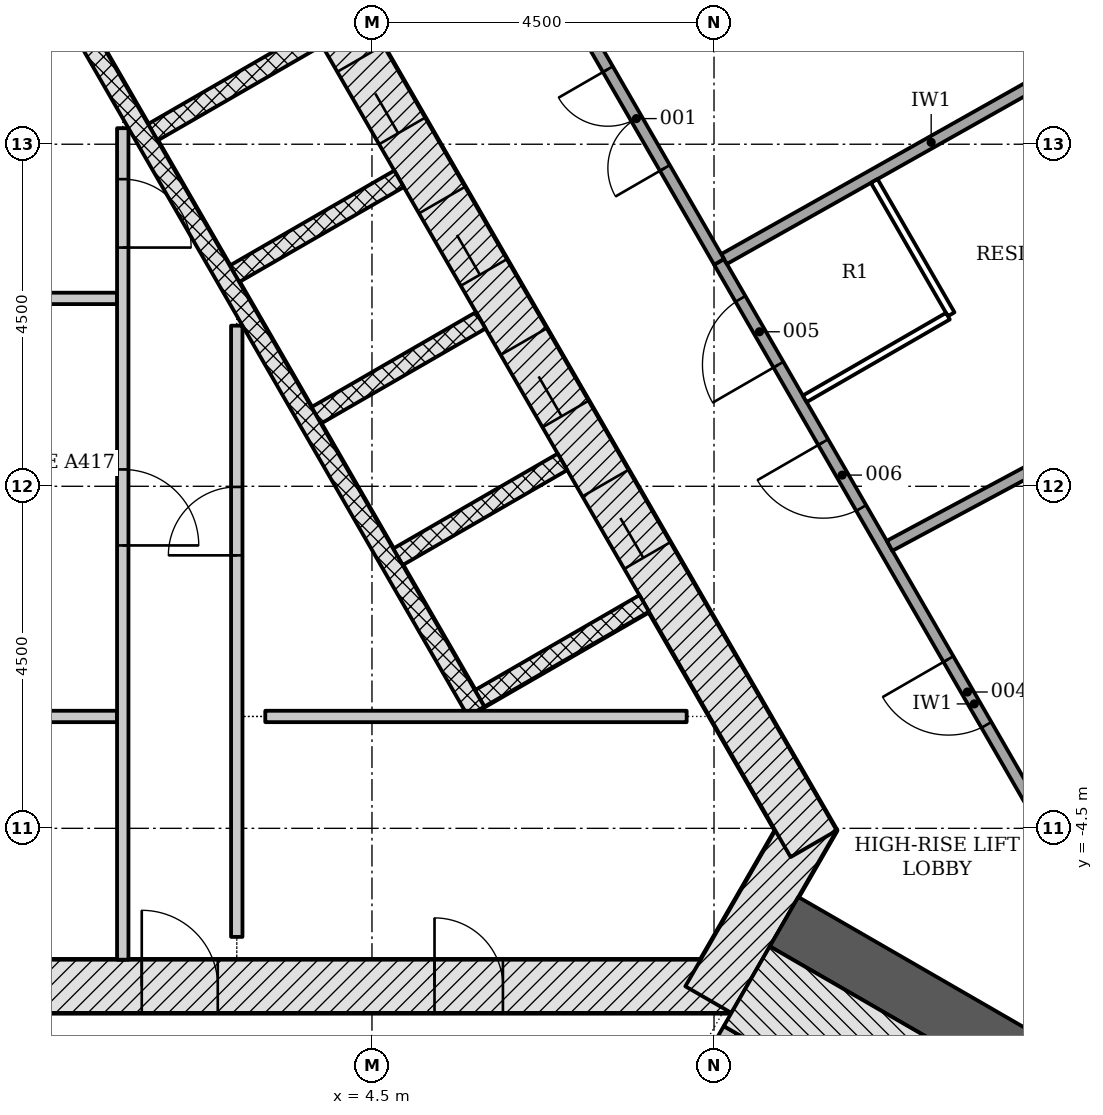
"""IFC4 building model, lengths in metres.
Left out: names, types, materials, properties, quantities, classifications, styles, units other than length and angle.
Written with IfcOpenShell. Run it as: python <this file> out.ifc"""

import sys

from ifc_helpers import new_model, si_unit, direction, frame, frame_2d, origin, place, context, subcontext, project, spatial, rectangle, extrude, element, fill, save


model = new_model("IFC4")
c1 = context("Model", 3, precision=1e-05, world=origin(), true_north=direction((0.0, 1.0)))
c2 = subcontext(c1, "Body", "Model", "MODEL_VIEW")
j1 = project(units=[si_unit("LENGTHUNIT", "METRE"), si_unit("PLANEANGLEUNIT", "RADIAN")], contexts=[c1])
p1 = place(None, origin())
s1 = spatial("IfcSite", under=j1, at=p1, CompositionType="ELEMENT")
p2 = place(p1, origin())
s2 = spatial("IfcBuilding", under=s1, at=p2, CompositionType="ELEMENT")
p3 = place(p2, frame((0.0, 0.0, 158.1)))
s3 = spatial("IfcBuildingStorey", under=s2, at=p3, CompositionType="ELEMENT", Elevation=158.1)
p4 = place(p3, frame((-9.229, -6.578, -0.2), z_axis=(0.0, 0.0, 1.0), x_axis=(1.0, 0.0, 0.0)))
e1 = element("IfcWall", 1, at=p4, inside=s3, PredefinedType="SHEAR", context=c2, shape_type="SweptSolid", body=[
    extrude(rectangle(XDim=18.458, YDim=0.7, at=frame_2d((9.229, 0.0))), origin(), (0.0, 0.0, 1.0), 3.6),
])
p5 = place(p4, frame((10.7, 0.0, 0.2)))
e2 = element("IfcOpeningElement", 2, at=p5, cuts=e1, PredefinedType="OPENING", context=c2, shape_type="SweptSolid", body=[
    extrude(rectangle(XDim=1.0, YDim=2.1, at=frame_2d((0.5, 1.05))), frame((0.0, 0.36, 0.0), z_axis=(0.0, -1.0, 0.0), x_axis=(1.0, 0.0, 0.0)), (0.0, 0.0, 1.0), 0.72),
])
p6 = place(p4, frame((4.977, 0.0, 0.2)))
e3 = element("IfcOpeningElement", 3, at=p6, cuts=e1, PredefinedType="OPENING", context=c2, shape_type="SweptSolid", body=[
    extrude(rectangle(XDim=0.9, YDim=2.1, at=frame_2d((0.45, 1.05))), frame((0.0, 0.36, 0.0), z_axis=(0.0, -1.0, 0.0), x_axis=(1.0, 0.0, 0.0)), (0.0, 0.0, 1.0), 0.72),
])
p7 = place(p4, frame((14.552, 0.0, 0.2)))
e4 = element("IfcOpeningElement", 4, at=p7, cuts=e1, PredefinedType="OPENING", context=c2, shape_type="SweptSolid", body=[
    extrude(rectangle(XDim=0.9, YDim=2.1, at=frame_2d((0.45, 1.05))), frame((0.0, 0.36, 0.0), z_axis=(0.0, -1.0, 0.0), x_axis=(1.0, 0.0, 0.0)), (0.0, 0.0, 1.0), 0.72),
])
p8 = place(p3, frame((8.926, -6.753, -0.2), z_axis=(0.0, 0.0, 1.0), x_axis=(0.500042739161, 0.866000726912, 0.0)))
e5 = element("IfcWall", 5, at=p8, inside=s3, PredefinedType="SHEAR", context=c2, shape_type="SweptSolid", body=[
    extrude(rectangle(XDim=2.771, YDim=0.7, at=frame_2d((1.386, 0.0))), origin(), (0.0, 0.0, 1.0), 3.6),
])
p9 = place(p3, frame((10.311, -4.703, -0.2), z_axis=(0.0, 0.0, 1.0), x_axis=(-0.500001446645, 0.866024568562, 0.0)))
e6 = element("IfcWall", 6, at=p9, inside=s3, PredefinedType="SHEAR", context=c2, shape_type="SweptSolid", body=[
    extrude(rectangle(XDim=18.458, YDim=0.7, at=frame_2d((9.229, 0.0))), origin(), (0.0, 0.0, 1.0), 3.6),
])
p10 = place(p9, frame((4.379, 0.0, 0.2)))
e7 = element("IfcOpeningElement", 7, at=p10, cuts=e6, PredefinedType="OPENING", context=c2, shape_type="SweptSolid", body=[
    extrude(rectangle(XDim=1.1, YDim=2.1, at=frame_2d((0.55, 1.05))), frame((0.0, 0.36, 0.0), z_axis=(0.0, -1.0, 0.0), x_axis=(1.0, 0.0, 0.0)), (0.0, 0.0, 1.0), 0.72),
])
p11 = place(p9, frame((6.529, 0.0, 0.2)))
e8 = element("IfcOpeningElement", 8, at=p11, cuts=e6, PredefinedType="OPENING", context=c2, shape_type="SweptSolid", body=[
    extrude(rectangle(XDim=1.1, YDim=2.1, at=frame_2d((0.55, 1.05))), frame((0.0, 0.36, 0.0), z_axis=(0.0, -1.0, 0.0), x_axis=(1.0, 0.0, 0.0)), (0.0, 0.0, 1.0), 0.72),
])
p12 = place(p9, frame((8.679, 0.0, 0.2)))
e9 = element("IfcOpeningElement", 9, at=p12, cuts=e6, PredefinedType="OPENING", context=c2, shape_type="SweptSolid", body=[
    extrude(rectangle(XDim=1.1, YDim=2.1, at=frame_2d((0.55, 1.05))), frame((0.0, 0.36, 0.0), z_axis=(0.0, -1.0, 0.0), x_axis=(1.0, 0.0, 0.0)), (0.0, 0.0, 1.0), 0.72),
])
p13 = place(p9, frame((10.829, 0.0, 0.2)))
e10 = element("IfcOpeningElement", 10, at=p13, cuts=e6, PredefinedType="OPENING", context=c2, shape_type="SweptSolid", body=[
    extrude(rectangle(XDim=1.1, YDim=2.1, at=frame_2d((0.55, 1.05))), frame((0.0, 0.36, 0.0), z_axis=(0.0, -1.0, 0.0), x_axis=(1.0, 0.0, 0.0)), (0.0, 0.0, 1.0), 0.72),
])
p14 = place(p9, frame((12.979, 0.0, 0.2)))
e11 = element("IfcOpeningElement", 11, at=p14, cuts=e6, PredefinedType="OPENING", context=c2, shape_type="SweptSolid", body=[
    extrude(rectangle(XDim=1.1, YDim=2.1, at=frame_2d((0.55, 1.05))), frame((0.0, 0.36, 0.0), z_axis=(0.0, -1.0, 0.0), x_axis=(1.0, 0.0, 0.0)), (0.0, 0.0, 1.0), 0.72),
])
p15 = place(p3, frame((9.922, -5.728, -0.2), z_axis=(0.0, 0.0, 1.0), x_axis=(0.866025410072, -0.499999989109, 0.0)))
e12 = element("IfcWall", 12, at=p15, inside=s3, PredefinedType="SHEAR", context=c2, shape_type="SweptSolid", body=[
    extrude(rectangle(XDim=10.331, YDim=0.75, at=frame_2d((5.165, 0.0))), origin(), (0.0, 0.0, 1.0), 3.6),
])
for number, where, z_axis, x_axis in (
    (13, (8.081, -1.541, -0.2), (0.0, 0.0, 1.0), (-0.866, -0.5, 0.0)),
    (14, (7.006, 0.321, -0.2), (0.0, 0.0, 1.0), (-0.866, -0.5, 0.0)),
):
    element("IfcWall", number, at=place(p3, frame(where, z_axis=z_axis, x_axis=x_axis)), inside=s3, PredefinedType="PARTITIONING", context=c2, shape_type="SweptSolid", body=[
        extrude(rectangle(XDim=2.5, YDim=0.25, at=frame_2d((1.25, 0.0))), origin(), (0.0, 0.0, 1.0), 3.6),
    ])
p16 = place(p3, frame((5.931, 2.183, -0.2), z_axis=(0.0, 0.0, 1.0), x_axis=(-0.866047370643, -0.499961950354, 0.0)))
e15 = element("IfcWall", 15, at=p16, inside=s3, PredefinedType="PARTITIONING", context=c2, shape_type="SweptSolid", body=[
    extrude(rectangle(XDim=2.5, YDim=0.25, at=frame_2d((1.25, 0.0))), origin(), (0.0, 0.0, 1.0), 3.6),
])
for number, where, z_axis, x_axis in (
    (16, (4.856, 4.045, -0.2), (0.0, 0.0, 1.0), (-0.866, -0.5, 0.0)),
    (17, (3.781, 5.907, -0.2), (0.0, 0.0, 1.0), (-0.866, -0.5, 0.0)),
):
    element("IfcWall", number, at=place(p3, frame(where, z_axis=z_axis, x_axis=x_axis)), inside=s3, PredefinedType="PARTITIONING", context=c2, shape_type="SweptSolid", body=[
        extrude(rectangle(XDim=2.5, YDim=0.25, at=frame_2d((1.25, 0.0))), origin(), (0.0, 0.0, 1.0), 3.6),
    ])
p17 = place(p3, frame((5.87, -2.961, 0.0), z_axis=(0.0, 0.0, 1.0), x_axis=(-0.50000615651, 0.866021849293, 0.0)))
e18 = element("IfcWall", 18, at=p17, inside=s3, PredefinedType="PARTITIONING", context=c2, shape_type="SweptSolid", body=[
    extrude(rectangle(XDim=11.0, YDim=0.25, at=frame_2d((5.5, 0.0))), origin(), (0.0, 0.0, 1.0), 3.4),
])
p18 = place(p3, frame((-5.258, -3.028, 0.0), z_axis=(0.0, 0.0, 1.0), x_axis=(1.0, 0.0, 0.0)))
e19 = element("IfcWall", 19, at=p18, inside=s3, PredefinedType="PARTITIONING", context=c2, shape_type="SweptSolid", body=[
    extrude(rectangle(XDim=6.404, YDim=0.15, at=frame_2d((3.202, 0.0))), origin(), (0.0, 0.0, 1.0), 3.4),
])
p19 = place(p3, frame((-2.551, 2.472, 0.0), z_axis=(0.0, 0.0, 1.0), x_axis=(1.0, 0.0, 0.0)))
e20 = element("IfcWall", 20, at=p19, inside=s3, PredefinedType="PARTITIONING", context=c2, shape_type="SweptSolid", body=[
    extrude(rectangle(XDim=3.698, YDim=0.15, at=frame_2d((1.849, 0.0))), origin(), (0.0, 0.0, 1.0), 3.4),
])
p20 = place(p3, frame((1.221, 4.711, 0.0), z_axis=(0.0, 0.0, 1.0), x_axis=(0.0, -1.0, 0.0)))
e21 = element("IfcWall", 21, at=p20, inside=s3, PredefinedType="PARTITIONING", context=c2, shape_type="SweptSolid", body=[
    extrude(rectangle(XDim=10.939, YDim=0.15, at=frame_2d((5.47, 0.0))), origin(), (0.0, 0.0, 1.0), 3.4),
])
p21 = place(p20, frame((4.489, 0.0, 0.0)))
e22 = element("IfcOpeningElement", 22, at=p21, cuts=e21, PredefinedType="OPENING", context=c2, shape_type="SweptSolid", body=[
    extrude(rectangle(XDim=1.0, YDim=2.1, at=frame_2d((0.5, 1.05))), frame((0.0, 0.085, 0.0), z_axis=(0.0, -1.0, 0.0), x_axis=(1.0, 0.0, 0.0)), (0.0, 0.0, 1.0), 0.17),
])
p22 = place(p20, frame((0.671, 0.0, 0.0)))
e23 = element("IfcOpeningElement", 23, at=p22, cuts=e21, PredefinedType="OPENING", context=c2, shape_type="SweptSolid", body=[
    extrude(rectangle(XDim=0.9, YDim=2.1, at=frame_2d((0.45, 1.05))), frame((0.0, 0.085, 0.0), z_axis=(0.0, -1.0, 0.0), x_axis=(1.0, 0.0, 0.0)), (0.0, 0.0, 1.0), 0.17),
])
p23 = place(p3, frame((2.721, -5.928, 0.0), z_axis=(0.0, 0.0, 1.0), x_axis=(0.0, 1.0, 0.0)))
e24 = element("IfcWall", 24, at=p23, inside=s3, PredefinedType="PARTITIONING", context=c2, shape_type="SweptSolid", body=[
    extrude(rectangle(XDim=8.041, YDim=0.15, at=frame_2d((4.021, 0.0))), origin(), (0.0, 0.0, 1.0), 3.4),
])
p24 = place(p23, frame((5.02, 0.0, 0.0)))
e25 = element("IfcOpeningElement", 25, at=p24, cuts=e24, PredefinedType="OPENING", context=c2, shape_type="SweptSolid", body=[
    extrude(rectangle(XDim=0.9, YDim=2.1, at=frame_2d((0.45, 1.05))), frame((0.0, 0.085, 0.0), z_axis=(0.0, -1.0, 0.0), x_axis=(1.0, 0.0, 0.0)), (0.0, 0.0, 1.0), 0.17),
])
p25 = place(p3, frame((3.096, -3.028, 0.0), z_axis=(0.0, 0.0, 1.0), x_axis=(1.0, 0.0, 0.0)))
e26 = element("IfcWall", 26, at=p25, inside=s3, PredefinedType="PARTITIONING", context=c2, shape_type="SweptSolid", body=[
    extrude(rectangle(XDim=5.544, YDim=0.15, at=frame_2d((2.772, 0.0))), origin(), (0.0, 0.0, 1.0), 3.4),
])
p26 = place(p3, frame((7.44, -10.226, -0.2), z_axis=(0.0, 0.0, 1.0), x_axis=(0.500022077904, 0.866012656725, 0.0)))
e27 = element("IfcWall", 27, at=p26, inside=s3, PredefinedType="SHEAR", context=c2, shape_type="SweptSolid", body=[
    extrude(rectangle(XDim=3.55, YDim=0.2, at=frame_2d((1.775, 0.0))), origin(), (0.0, 0.0, 1.0), 3.6),
])
p27 = place(p26, frame((1.175, 0.0, 0.2)))
e28 = element("IfcOpeningElement", 28, at=p27, cuts=e27, PredefinedType="OPENING", context=c2, shape_type="SweptSolid", body=[
    extrude(rectangle(XDim=1.2, YDim=2.1, at=frame_2d((0.6, 1.05))), frame((0.0, 0.11, 0.0), z_axis=(0.0, -1.0, 0.0), x_axis=(1.0, 0.0, 0.0)), (0.0, 0.0, 1.0), 0.22),
])
p28 = place(p3, frame((9.431, -6.577, -0.2), z_axis=(0.0, 0.0, 1.0), x_axis=(0.866018442252, -0.500012057535, 0.0)))
e29 = element("IfcWall", 29, at=p28, inside=s3, PredefinedType="SHEAR", context=c2, shape_type="SweptSolid", body=[
    extrude(rectangle(XDim=7.2, YDim=1.211, at=frame_2d((3.6, 0.0))), origin(), (0.0, 0.0, 1.0), 3.6),
])
p29 = place(p3, frame((15.782, -8.679, 0.0), z_axis=(0.0, 0.0, 1.0), x_axis=(-0.499998343211, 0.86602636033, 0.0)))
e30 = element("IfcWall", 30, at=p29, inside=s3, PredefinedType="PARTITIONING", context=c2, shape_type="SweptSolid", body=[
    extrude(rectangle(XDim=13.431, YDim=0.15, at=frame_2d((6.715, 0.0))), origin(), (0.0, 0.0, 1.0), 2.847),
])
p30 = place(p29, frame((6.396, 0.0, 0.0)))
e31 = element("IfcOpeningElement", 31, at=p30, cuts=e30, PredefinedType="OPENING", context=c2, shape_type="SweptSolid", body=[
    extrude(rectangle(XDim=1.0, YDim=2.1, at=frame_2d((0.5, 1.05))), frame((0.0, 0.085, 0.0), z_axis=(0.0, -1.0, 0.0), x_axis=(1.0, 0.0, 0.0)), (0.0, 0.0, 1.0), 0.17),
])
p31 = place(p29, frame((11.869, 0.0, 0.0)))
e32 = element("IfcOpeningElement", 32, at=p31, cuts=e30, PredefinedType="OPENING", context=c2, shape_type="SweptSolid", body=[
    extrude(rectangle(XDim=1.0, YDim=2.1, at=frame_2d((0.5, 1.05))), frame((0.0, 0.085, 0.0), z_axis=(0.0, -1.0, 0.0), x_axis=(1.0, 0.0, 0.0)), (0.0, 0.0, 1.0), 0.17),
])
p32 = place(p29, frame((9.691, 0.0, 0.0)))
e33 = element("IfcOpeningElement", 33, at=p32, cuts=e30, PredefinedType="OPENING", context=c2, shape_type="SweptSolid", body=[
    extrude(rectangle(XDim=1.0, YDim=2.1, at=frame_2d((0.5, 1.05))), frame((0.0, 0.085, 0.0), z_axis=(0.0, -1.0, 0.0), x_axis=(1.0, 0.0, 0.0)), (0.0, 0.0, 1.0), 0.17),
])
p33 = place(p3, frame((14.582, 6.06, 0.0), z_axis=(0.0, 0.0, 1.0), x_axis=(-0.871229292109, -0.490876278272, 0.0)))
e34 = element("IfcWall", 34, at=p33, inside=s3, PredefinedType="PARTITIONING", context=c2, shape_type="SweptSolid", body=[
    extrude(rectangle(XDim=6.256, YDim=0.15, at=frame_2d((3.128, 0.0))), origin(), (0.0, 0.0, 1.0), 3.4),
])
p34 = place(p3, frame((9.067, 2.953, 0.0), z_axis=(0.0, 0.0, 1.0), x_axis=(-0.499987877897, 0.866032402371, 0.0)))
e35 = element("IfcWall", 35, at=p34, inside=s3, PredefinedType="PARTITIONING", context=c2, shape_type="SweptSolid", body=[
    extrude(rectangle(XDim=4.353, YDim=0.15, at=frame_2d((2.176, 0.0))), origin(), (0.0, 0.0, 1.0), 2.847),
])
p35 = place(p34, frame((1.426, 0.0, 0.0)))
e36 = element("IfcOpeningElement", 36, at=p35, cuts=e35, PredefinedType="OPENING", context=c2, shape_type="SweptSolid", body=[
    extrude(rectangle(XDim=1.5, YDim=2.1, at=frame_2d((0.75, 1.05))), frame((0.0, 0.085, 0.0), z_axis=(0.0, -1.0, 0.0), x_axis=(1.0, 0.0, 0.0)), (0.0, 0.0, 1.0), 0.17),
])
p36 = place(p3, frame((16.747, 2.132, 0.0), z_axis=(0.0, 0.0, 1.0), x_axis=(-0.881303399969, -0.472550862028, 0.0)))
e37 = element("IfcWall", 37, at=p36, inside=s3, PredefinedType="PARTITIONING", context=c2, shape_type="SweptSolid", body=[
    extrude(rectangle(XDim=6.169, YDim=0.15, at=frame_2d((3.084, 0.0))), origin(), (0.0, 0.0, 1.0), 3.4),
])
p37 = place(p3, frame((11.108, 4.017, 0.0), z_axis=(0.0, 0.0, 1.0), x_axis=(0.500028539159, -0.866008926066, 0.0)))
e38 = element("IfcWall", 38, at=p37, inside=s3, PredefinedType="PARTITIONING", context=c2, shape_type="SweptSolid", body=[
    extrude(rectangle(XDim=2.025, YDim=0.1, at=frame_2d((1.013, 0.0))), origin(), (0.0, 0.0, 1.0), 2.847),
])
p38 = place(p3, frame((12.077, 2.238, 0.0), z_axis=(0.0, 0.0, 1.0), x_axis=(-0.866037911478, -0.499978335414, 0.0)))
e39 = element("IfcWall", 39, at=p38, inside=s3, PredefinedType="PARTITIONING", context=c2, shape_type="SweptSolid", body=[
    extrude(rectangle(XDim=2.175, YDim=0.1, at=frame_2d((1.087, 0.0))), origin(), (0.0, 0.0, 1.0), 3.4),
])
p39 = place(p10, origin())
e40 = element("IfcDoor", 40, at=p39, inside=s3, OperationType="DOUBLE_DOOR_SLIDING", PredefinedType="DOOR", context=c2, shape_type="SweptSolid", body=[
    extrude(rectangle(XDim=1.1, YDim=2.1, at=frame_2d((0.55, 1.05))), frame((0.0, 0.025, 0.0), z_axis=(0.0, -1.0, 0.0), x_axis=(1.0, 0.0, 0.0)), (0.0, 0.0, 1.0), 0.05),
])
fill(e7, e40)
p40 = place(p11, origin())
e41 = element("IfcDoor", 41, at=p40, inside=s3, OperationType="DOUBLE_DOOR_SLIDING", PredefinedType="DOOR", context=c2, shape_type="SweptSolid", body=[
    extrude(rectangle(XDim=1.1, YDim=2.1, at=frame_2d((0.55, 1.05))), frame((0.0, 0.025, 0.0), z_axis=(0.0, -1.0, 0.0), x_axis=(1.0, 0.0, 0.0)), (0.0, 0.0, 1.0), 0.05),
])
fill(e8, e41)
p41 = place(p12, origin())
e42 = element("IfcDoor", 42, at=p41, inside=s3, OperationType="DOUBLE_DOOR_SLIDING", PredefinedType="DOOR", context=c2, shape_type="SweptSolid", body=[
    extrude(rectangle(XDim=1.1, YDim=2.1, at=frame_2d((0.55, 1.05))), frame((0.0, 0.025, 0.0), z_axis=(0.0, -1.0, 0.0), x_axis=(1.0, 0.0, 0.0)), (0.0, 0.0, 1.0), 0.05),
])
fill(e9, e42)
p42 = place(p13, origin())
e43 = element("IfcDoor", 43, at=p42, inside=s3, OperationType="DOUBLE_DOOR_SLIDING", PredefinedType="DOOR", context=c2, shape_type="SweptSolid", body=[
    extrude(rectangle(XDim=1.1, YDim=2.1, at=frame_2d((0.55, 1.05))), frame((0.0, 0.025, 0.0), z_axis=(0.0, -1.0, 0.0), x_axis=(1.0, 0.0, 0.0)), (0.0, 0.0, 1.0), 0.05),
])
fill(e10, e43)
p43 = place(p5, origin())
e44 = element("IfcDoor", 44, at=p43, inside=s3, OperationType="SINGLE_SWING_LEFT", PredefinedType="DOOR", context=c2, shape_type="SweptSolid", body=[
    extrude(rectangle(XDim=1.0, YDim=2.1, at=frame_2d((0.5, 1.05))), frame((0.0, 0.075, 0.0), z_axis=(0.0, -1.0, 0.0), x_axis=(1.0, 0.0, 0.0)), (0.0, 0.0, 1.0), 0.15),
])
fill(e2, e44)
p44 = place(p7, origin())
e45 = element("IfcDoor", 45, at=p44, inside=s3, OperationType="SINGLE_SWING_LEFT", PredefinedType="DOOR", context=c2, shape_type="SweptSolid", body=[
    extrude(rectangle(XDim=0.9, YDim=2.1, at=frame_2d((0.45, 1.05))), frame((0.0, 0.075, 0.0), z_axis=(0.0, -1.0, 0.0), x_axis=(1.0, 0.0, 0.0)), (0.0, 0.0, 1.0), 0.15),
])
fill(e4, e45)
p45 = place(p21, origin())
e46 = element("IfcDoor", 46, at=p45, inside=s3, OperationType="SINGLE_SWING_RIGHT", PredefinedType="DOOR", context=c2, shape_type="SweptSolid", body=[
    extrude(rectangle(XDim=1.0, YDim=2.1, at=frame_2d((0.5, 1.05))), frame((0.0, 0.025, 0.0), z_axis=(0.0, -1.0, 0.0), x_axis=(1.0, 0.0, 0.0)), (0.0, 0.0, 1.0), 0.05),
])
fill(e22, e46)
p46 = place(p24, origin())
e47 = element("IfcDoor", 47, at=p46, inside=s3, OperationType="SINGLE_SWING_LEFT", PredefinedType="DOOR", context=c2, shape_type="SweptSolid", body=[
    extrude(rectangle(XDim=0.9, YDim=2.1, at=frame_2d((0.45, 1.05))), frame((0.0, 0.025, 0.0), z_axis=(0.0, -1.0, 0.0), x_axis=(1.0, 0.0, 0.0)), (0.0, 0.0, 1.0), 0.05),
])
fill(e25, e47)
p47 = place(p22, origin())
e48 = element("IfcDoor", 48, at=p47, inside=s3, OperationType="SINGLE_SWING_RIGHT", PredefinedType="DOOR", context=c2, shape_type="SweptSolid", body=[
    extrude(rectangle(XDim=0.9, YDim=2.1, at=frame_2d((0.45, 1.05))), frame((0.0, 0.025, 0.0), z_axis=(0.0, -1.0, 0.0), x_axis=(1.0, 0.0, 0.0)), (0.0, 0.0, 1.0), 0.05),
])
fill(e23, e48)
p48 = place(p35, origin())
e49 = element("IfcDoor", 49, at=p48, inside=s3, OperationType="DOUBLE_DOOR_SINGLE_SWING", PredefinedType="DOOR", context=c2, shape_type="SweptSolid", body=[
    extrude(rectangle(XDim=1.5, YDim=2.1, at=frame_2d((0.75, 1.05))), frame((0.0, 0.025, 0.0), z_axis=(0.0, -1.0, 0.0), x_axis=(1.0, 0.0, 0.0)), (0.0, 0.0, 1.0), 0.05),
])
fill(e36, e49)
p49 = place(p30, origin())
e50 = element("IfcDoor", 50, at=p49, inside=s3, OperationType="SINGLE_SWING_RIGHT", PredefinedType="DOOR", context=c2, shape_type="SweptSolid", body=[
    extrude(rectangle(XDim=1.0, YDim=2.1, at=frame_2d((0.5, 1.05))), frame((0.0, 0.025, 0.0), z_axis=(0.0, -1.0, 0.0), x_axis=(1.0, 0.0, 0.0)), (0.0, 0.0, 1.0), 0.05),
])
fill(e31, e50)
p50 = place(p31, origin())
e51 = element("IfcDoor", 51, at=p50, inside=s3, OperationType="SINGLE_SWING_LEFT", PredefinedType="DOOR", context=c2, shape_type="SweptSolid", body=[
    extrude(rectangle(XDim=1.0, YDim=2.1, at=frame_2d((0.5, 1.05))), frame((0.0, 0.025, 0.0), z_axis=(0.0, -1.0, 0.0), x_axis=(1.0, 0.0, 0.0)), (0.0, 0.0, 1.0), 0.05),
])
fill(e32, e51)
p51 = place(p32, origin())
e52 = element("IfcDoor", 52, at=p51, inside=s3, OperationType="SINGLE_SWING_RIGHT", PredefinedType="DOOR", context=c2, shape_type="SweptSolid", body=[
    extrude(rectangle(XDim=1.0, YDim=2.1, at=frame_2d((0.5, 1.05))), frame((0.0, 0.025, 0.0), z_axis=(0.0, -1.0, 0.0), x_axis=(1.0, 0.0, 0.0)), (0.0, 0.0, 1.0), 0.05),
])
fill(e33, e52)
save(model, sys.argv[1])
